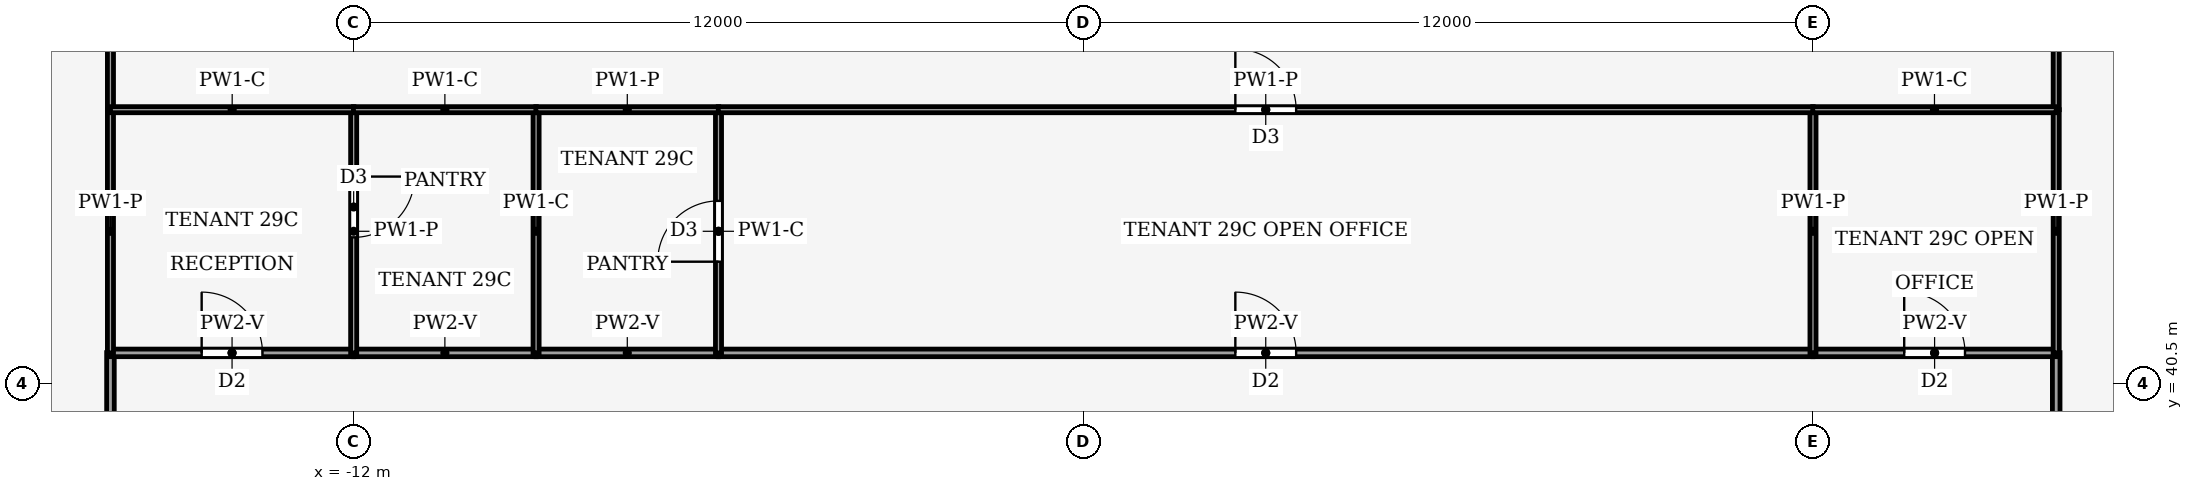
"""IFC4 building model, lengths in metres.
Left out: names, types, materials, properties, quantities, classifications, styles, units other than length and angle.
Written with IfcOpenShell. Run it as: python <this file> out.ifc"""

import sys

from ifc_helpers import new_model, si_unit, direction, frame, frame_2d, origin, place, context, subcontext, project, spatial, rectangle, extrude, element, fill, save


model = new_model("IFC4")
c1 = context("Model", 3, precision=1e-05, world=origin(), true_north=direction((0.0, 1.0)))
c2 = subcontext(c1, "Body", "Model", "MODEL_VIEW")
j1 = project(units=[si_unit("LENGTHUNIT", "METRE"), si_unit("PLANEANGLEUNIT", "RADIAN")], contexts=[c1])
p1 = place(None, origin())
s1 = spatial("IfcSite", under=j1, at=p1, CompositionType="ELEMENT")
p2 = place(p1, origin())
s2 = spatial("IfcBuilding", under=s1, at=p2, CompositionType="ELEMENT")
p3 = place(p2, frame((0.0, 0.0, 130.0)))
s3 = spatial("IfcBuildingStorey", under=s2, at=p3, CompositionType="ELEMENT", Elevation=130.0)
p4 = place(p3, frame((-16.0, 36.0, 0.0), z_axis=(0.0, 0.0, 1.0), x_axis=(0.0, 1.0, 0.0)))
e1 = element("IfcWall", 1, at=p4, inside=s3, PredefinedType="PARTITIONING", context=c2, shape_type="SweptSolid", body=[
    extrude(rectangle(XDim=5.004, YDim=0.125, at=frame_2d((2.502, 0.0))), origin(), (0.0, 0.0, 1.0), 3.14),
])
p5 = place(p4, frame((2.002, 0.0, 0.0)))
e2 = element("IfcOpeningElement", 2, at=p5, cuts=e1, PredefinedType="OPENING", context=c2, shape_type="SweptSolid", body=[
    extrude(rectangle(XDim=1.0, YDim=2.1, at=frame_2d((0.5, 1.05))), frame((0.0, 0.073, 0.0), z_axis=(0.0, -1.0, 0.0), x_axis=(1.0, 0.0, 0.0)), (0.0, 0.0, 1.0), 0.145),
])
p6 = place(p3, frame((16.0, 41.004, 0.0), z_axis=(0.0, 0.0, 1.0), x_axis=(0.0, -1.0, 0.0)))
e3 = element("IfcWall", 3, at=p6, inside=s3, PredefinedType="PARTITIONING", context=c2, shape_type="SweptSolid", body=[
    extrude(rectangle(XDim=5.004, YDim=0.125, at=frame_2d((2.502, 0.0))), origin(), (0.0, 0.0, 1.0), 3.14),
])
p7 = place(p6, frame((2.002, 0.0, 0.0)))
e4 = element("IfcOpeningElement", 4, at=p7, cuts=e3, PredefinedType="OPENING", context=c2, shape_type="SweptSolid", body=[
    extrude(rectangle(XDim=1.0, YDim=2.1, at=frame_2d((0.5, 1.05))), frame((0.0, 0.073, 0.0), z_axis=(0.0, -1.0, 0.0), x_axis=(1.0, 0.0, 0.0)), (0.0, 0.0, 1.0), 0.145),
])
p8 = place(p3, frame((-16.0, 41.0, 0.0), z_axis=(0.0, 0.0, 1.0), x_axis=(1.0, 0.0, 0.0)))
e5 = element("IfcWall", 5, at=p8, inside=s3, PredefinedType="PARTITIONING", context=c2, shape_type="SweptSolid", body=[
    extrude(rectangle(XDim=4.0, YDim=0.125, at=frame_2d((2.0, 0.0))), origin(), (0.0, 0.0, 1.0), 3.44),
])
p9 = place(p8, frame((1.5, 0.0, 0.0)))
e6 = element("IfcOpeningElement", 6, at=p9, cuts=e5, PredefinedType="OPENING", context=c2, shape_type="SweptSolid", body=[
    extrude(rectangle(XDim=1.0, YDim=2.1, at=frame_2d((0.5, 1.05))), frame((0.0, 0.073, 0.0), z_axis=(0.0, -1.0, 0.0), x_axis=(1.0, 0.0, 0.0)), (0.0, 0.0, 1.0), 0.145),
])
for number, where, z_axis, x_axis in (
    (7, (-9.0, 41.0, 0.0), (0.0, 0.0, 1.0), (-1.0, 0.0, 0.0)),
    (8, (-6.0, 41.0, 0.0), (0.0, 0.0, 1.0), (-1.0, 0.0, 0.0)),
):
    element("IfcWall", number, at=place(p3, frame(where, z_axis=z_axis, x_axis=x_axis)), inside=s3, PredefinedType="PARTITIONING", context=c2, shape_type="SweptSolid", body=[
        extrude(rectangle(XDim=3.0, YDim=0.125, at=frame_2d((1.5, 0.0))), origin(), (0.0, 0.0, 1.0), 3.44),
    ])
p10 = place(p3, frame((-6.0, 41.0, 0.0), z_axis=(0.0, 0.0, 1.0), x_axis=(1.0, 0.0, 0.0)))
e9 = element("IfcWall", 9, at=p10, inside=s3, PredefinedType="PARTITIONING", context=c2, shape_type="SweptSolid", body=[
    extrude(rectangle(XDim=18.0, YDim=0.125, at=frame_2d((9.0, 0.0))), origin(), (0.0, 0.0, 1.0), 3.44),
])
p11 = place(p10, frame((8.5, 0.0, 0.0)))
e10 = element("IfcOpeningElement", 10, at=p11, cuts=e9, PredefinedType="OPENING", context=c2, shape_type="SweptSolid", body=[
    extrude(rectangle(XDim=1.0, YDim=2.1, at=frame_2d((0.5, 1.05))), frame((0.0, 0.073, 0.0), z_axis=(0.0, -1.0, 0.0), x_axis=(1.0, 0.0, 0.0)), (0.0, 0.0, 1.0), 0.145),
])
p12 = place(p3, frame((12.0, 41.0, 0.0), z_axis=(0.0, 0.0, 1.0), x_axis=(1.0, 0.0, 0.0)))
e11 = element("IfcWall", 11, at=p12, inside=s3, PredefinedType="PARTITIONING", context=c2, shape_type="SweptSolid", body=[
    extrude(rectangle(XDim=4.0, YDim=0.125, at=frame_2d((2.0, 0.0))), origin(), (0.0, 0.0, 1.0), 3.44),
])
p13 = place(p12, frame((1.5, 0.0, 0.0)))
e12 = element("IfcOpeningElement", 12, at=p13, cuts=e11, PredefinedType="OPENING", context=c2, shape_type="SweptSolid", body=[
    extrude(rectangle(XDim=1.0, YDim=2.1, at=frame_2d((0.5, 1.05))), frame((0.0, 0.073, 0.0), z_axis=(0.0, -1.0, 0.0), x_axis=(1.0, 0.0, 0.0)), (0.0, 0.0, 1.0), 0.145),
])
p14 = place(p3, frame((-16.0, 41.0, 0.0), z_axis=(0.0, 0.0, 1.0), x_axis=(0.0, 1.0, 0.0)))
e13 = element("IfcWall", 13, at=p14, inside=s3, PredefinedType="PARTITIONING", context=c2, shape_type="SweptSolid", body=[
    extrude(rectangle(XDim=4.0, YDim=0.1, at=frame_2d((2.0, 0.0))), origin(), (0.0, 0.0, 1.0), 3.44),
])
p15 = place(p3, frame((-16.0, 45.0, 0.0), z_axis=(0.0, 0.0, 1.0), x_axis=(0.0, 1.0, 0.0)))
e14 = element("IfcWall", 14, at=p15, inside=s3, PredefinedType="PARTITIONING", context=c2, shape_type="SweptSolid", body=[
    extrude(rectangle(XDim=9.0, YDim=0.1, at=frame_2d((4.5, 0.0))), origin(), (0.0, 0.0, 1.0), 3.24),
])
p16 = place(p3, frame((16.0, 45.0, 0.0), z_axis=(0.0, 0.0, 1.0), x_axis=(0.0, -1.0, 0.0)))
e15 = element("IfcWall", 15, at=p16, inside=s3, PredefinedType="PARTITIONING", context=c2, shape_type="SweptSolid", body=[
    extrude(rectangle(XDim=4.0, YDim=0.1, at=frame_2d((2.0, 0.0))), origin(), (0.0, 0.0, 1.0), 3.44),
])
p17 = place(p3, frame((16.0, 54.0, 0.0), z_axis=(0.0, 0.0, 1.0), x_axis=(0.0, -1.0, 0.0)))
e16 = element("IfcWall", 16, at=p17, inside=s3, PredefinedType="PARTITIONING", context=c2, shape_type="SweptSolid", body=[
    extrude(rectangle(XDim=9.0, YDim=0.1, at=frame_2d((4.5, 0.0))), origin(), (0.0, 0.0, 1.0), 3.24),
])
p18 = place(p3, frame((-12.0, 45.0, 0.0), z_axis=(0.0, 0.0, 1.0), x_axis=(0.0, -1.0, 0.0)))
e17 = element("IfcWall", 17, at=p18, inside=s3, PredefinedType="PARTITIONING", context=c2, shape_type="SweptSolid", body=[
    extrude(rectangle(XDim=4.0, YDim=0.1, at=frame_2d((2.0, 0.0))), origin(), (0.0, 0.0, 1.0), 3.44),
])
p19 = place(p18, frame((1.1, 0.0, 0.0)))
e18 = element("IfcOpeningElement", 18, at=p19, cuts=e17, PredefinedType="OPENING", context=c2, shape_type="SweptSolid", body=[
    extrude(rectangle(XDim=1.0, YDim=2.1, at=frame_2d((0.5, 1.05))), frame((0.0, 0.06, 0.0), z_axis=(0.0, -1.0, 0.0), x_axis=(1.0, 0.0, 0.0)), (0.0, 0.0, 1.0), 0.12),
])
p20 = place(p3, frame((-11.996, 45.0, 0.0), z_axis=(0.0, 0.0, 1.0), x_axis=(-1.0, 0.0, 0.0)))
e19 = element("IfcWall", 19, at=p20, inside=s3, PredefinedType="PARTITIONING", context=c2, shape_type="SweptSolid", body=[
    extrude(rectangle(XDim=4.004, YDim=0.1, at=frame_2d((2.002, 0.0))), origin(), (0.0, 0.0, 1.0), 3.87),
])
p21 = place(p3, frame((-9.0, 41.0, 0.0), z_axis=(0.0, 0.0, 1.0), x_axis=(0.0, 1.0, 0.0)))
e20 = element("IfcWall", 20, at=p21, inside=s3, PredefinedType="PARTITIONING", context=c2, shape_type="SweptSolid", body=[
    extrude(rectangle(XDim=4.0, YDim=0.1, at=frame_2d((2.0, 0.0))), origin(), (0.0, 0.0, 1.0), 3.87),
])
p22 = place(p3, frame((-8.996, 45.0, 0.0), z_axis=(0.0, 0.0, 1.0), x_axis=(-1.0, 0.0, 0.0)))
e21 = element("IfcWall", 21, at=p22, inside=s3, PredefinedType="PARTITIONING", context=c2, shape_type="SweptSolid", body=[
    extrude(rectangle(XDim=3.008, YDim=0.1, at=frame_2d((1.504, 0.0))), origin(), (0.0, 0.0, 1.0), 3.87),
])
p23 = place(p3, frame((-6.0, 41.0, 0.0), z_axis=(0.0, 0.0, 1.0), x_axis=(0.0, 1.0, 0.0)))
e22 = element("IfcWall", 22, at=p23, inside=s3, PredefinedType="PARTITIONING", context=c2, shape_type="SweptSolid", body=[
    extrude(rectangle(XDim=4.0, YDim=0.1, at=frame_2d((2.0, 0.0))), origin(), (0.0, 0.0, 1.0), 3.87),
])
p24 = place(p23, frame((1.5, 0.0, 0.0)))
e23 = element("IfcOpeningElement", 23, at=p24, cuts=e22, PredefinedType="OPENING", context=c2, shape_type="SweptSolid", body=[
    extrude(rectangle(XDim=1.0, YDim=2.1, at=frame_2d((0.5, 1.05))), frame((0.0, 0.06, 0.0), z_axis=(0.0, -1.0, 0.0), x_axis=(1.0, 0.0, 0.0)), (0.0, 0.0, 1.0), 0.12),
])
p25 = place(p3, frame((-5.996, 45.0, 0.0), z_axis=(0.0, 0.0, 1.0), x_axis=(-1.0, 0.0, 0.0)))
e24 = element("IfcWall", 24, at=p25, inside=s3, PredefinedType="PARTITIONING", context=c2, shape_type="SweptSolid", body=[
    extrude(rectangle(XDim=3.008, YDim=0.1, at=frame_2d((1.504, 0.0))), origin(), (0.0, 0.0, 1.0), 3.44),
])
p26 = place(p3, frame((12.0, 41.0, 0.0), z_axis=(0.0, 0.0, 1.0), x_axis=(0.0, 1.0, 0.0)))
e25 = element("IfcWall", 25, at=p26, inside=s3, PredefinedType="PARTITIONING", context=c2, shape_type="SweptSolid", body=[
    extrude(rectangle(XDim=4.0, YDim=0.1, at=frame_2d((2.0, 0.0))), origin(), (0.0, 0.0, 1.0), 3.44),
])
p27 = place(p3, frame((-6.004, 45.0, 0.0), z_axis=(0.0, 0.0, 1.0), x_axis=(1.0, 0.0, 0.0)))
e26 = element("IfcWall", 26, at=p27, inside=s3, PredefinedType="PARTITIONING", context=c2, shape_type="SweptSolid", body=[
    extrude(rectangle(XDim=18.008, YDim=0.1, at=frame_2d((9.004, 0.0))), origin(), (0.0, 0.0, 1.0), 3.44),
])
p28 = place(p27, frame((8.504, 0.0, 0.0)))
e27 = element("IfcOpeningElement", 27, at=p28, cuts=e26, PredefinedType="OPENING", context=c2, shape_type="SweptSolid", body=[
    extrude(rectangle(XDim=1.0, YDim=2.1, at=frame_2d((0.5, 1.05))), frame((0.0, 0.06, 0.0), z_axis=(0.0, -1.0, 0.0), x_axis=(1.0, 0.0, 0.0)), (0.0, 0.0, 1.0), 0.12),
])
p29 = place(p3, frame((16.0, 45.0, 0.0), z_axis=(0.0, 0.0, 1.0), x_axis=(-1.0, 0.0, 0.0)))
e28 = element("IfcWall", 28, at=p29, inside=s3, PredefinedType="PARTITIONING", context=c2, shape_type="SweptSolid", body=[
    extrude(rectangle(XDim=4.004, YDim=0.1, at=frame_2d((2.002, 0.0))), origin(), (0.0, 0.0, 1.0), 3.87),
])
p30 = place(p9, origin())
e29 = element("IfcDoor", 29, at=p30, inside=s3, OperationType="SINGLE_SWING_RIGHT", PredefinedType="DOOR", context=c2, shape_type="SweptSolid", body=[
    extrude(rectangle(XDim=1.0, YDim=2.1, at=frame_2d((0.5, 1.05))), frame((0.0, 0.025, 0.0), z_axis=(0.0, -1.0, 0.0), x_axis=(1.0, 0.0, 0.0)), (0.0, 0.0, 1.0), 0.05),
])
fill(e6, e29)
p31 = place(p11, origin())
e30 = element("IfcDoor", 30, at=p31, inside=s3, OperationType="SINGLE_SWING_LEFT", PredefinedType="DOOR", context=c2, shape_type="SweptSolid", body=[
    extrude(rectangle(XDim=1.0, YDim=2.1, at=frame_2d((0.5, 1.05))), frame((0.0, 0.025, 0.0), z_axis=(0.0, -1.0, 0.0), x_axis=(1.0, 0.0, 0.0)), (0.0, 0.0, 1.0), 0.05),
])
fill(e10, e30)
p32 = place(p13, origin())
e31 = element("IfcDoor", 31, at=p32, inside=s3, OperationType="SINGLE_SWING_RIGHT", PredefinedType="DOOR", context=c2, shape_type="SweptSolid", body=[
    extrude(rectangle(XDim=1.0, YDim=2.1, at=frame_2d((0.5, 1.05))), frame((0.0, 0.025, 0.0), z_axis=(0.0, -1.0, 0.0), x_axis=(1.0, 0.0, 0.0)), (0.0, 0.0, 1.0), 0.05),
])
fill(e12, e31)
p33 = place(p19, origin())
e32 = element("IfcDoor", 32, at=p33, inside=s3, OperationType="SINGLE_SWING_LEFT", PredefinedType="DOOR", context=c2, shape_type="SweptSolid", body=[
    extrude(rectangle(XDim=1.0, YDim=2.1, at=frame_2d((0.5, 1.05))), frame((0.0, 0.025, 0.0), z_axis=(0.0, -1.0, 0.0), x_axis=(1.0, 0.0, 0.0)), (0.0, 0.0, 1.0), 0.05),
])
fill(e18, e32)
p34 = place(p24, origin())
e33 = element("IfcDoor", 33, at=p34, inside=s3, OperationType="SINGLE_SWING_RIGHT", PredefinedType="DOOR", context=c2, shape_type="SweptSolid", body=[
    extrude(rectangle(XDim=1.0, YDim=2.1, at=frame_2d((0.5, 1.05))), frame((0.0, 0.025, 0.0), z_axis=(0.0, -1.0, 0.0), x_axis=(1.0, 0.0, 0.0)), (0.0, 0.0, 1.0), 0.05),
])
fill(e23, e33)
p35 = place(p28, origin())
e34 = element("IfcDoor", 34, at=p35, inside=s3, OperationType="SINGLE_SWING_LEFT", PredefinedType="DOOR", context=c2, shape_type="SweptSolid", body=[
    extrude(rectangle(XDim=1.0, YDim=2.1, at=frame_2d((0.5, 1.05))), frame((0.0, 0.025, 0.0), z_axis=(0.0, -1.0, 0.0), x_axis=(1.0, 0.0, 0.0)), (0.0, 0.0, 1.0), 0.05),
])
fill(e27, e34)
save(model, sys.argv[1])
